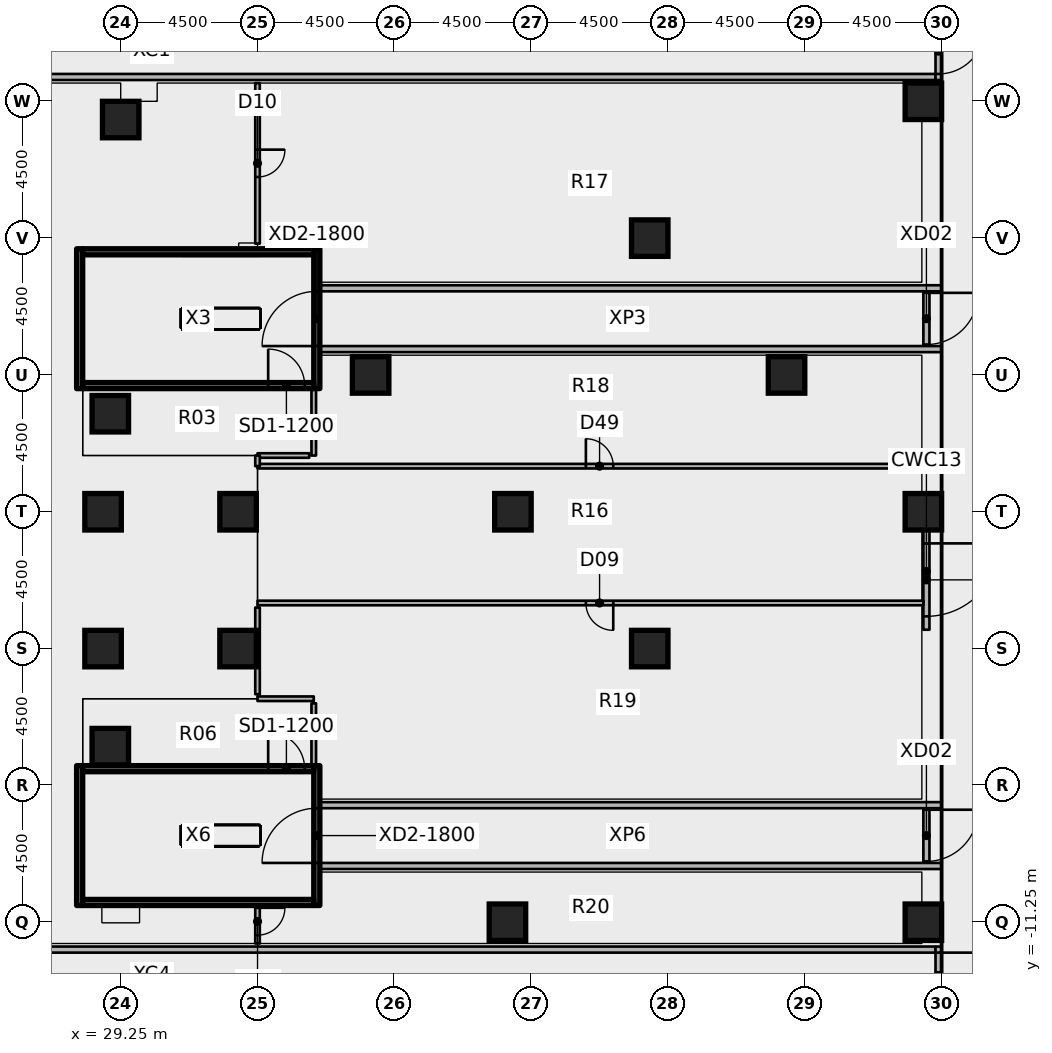
"""IFC4 building model, lengths in metres.
Left out: names, types, materials, properties, quantities, classifications, styles, units other than length and angle.
Written with IfcOpenShell. Run it as: python <this file> out.ifc"""

import sys

from ifc_helpers import new_model, si_unit, direction, frame, frame_2d, origin, origin_2d, place, context, subcontext, project, spatial, rectangle, extrude, element, fill, save


model = new_model("IFC4")
c1 = context("Model", 3, precision=1e-05, world=origin(), true_north=direction((0.0, 1.0)))
c2 = subcontext(c1, "Body", "Model", "MODEL_VIEW")
j1 = project(units=[si_unit("LENGTHUNIT", "METRE"), si_unit("PLANEANGLEUNIT", "RADIAN")], contexts=[c1])
p1 = place(None, origin())
s1 = spatial("IfcSite", under=j1, at=p1, CompositionType="ELEMENT")
p2 = place(p1, origin())
s2 = spatial("IfcBuilding", under=s1, at=p2, CompositionType="ELEMENT")
p3 = place(p2, origin())
s3 = spatial("IfcBuildingStorey", under=s2, at=p3, CompositionType="ELEMENT", Elevation=0.0)
for number, where, z_axis, x_axis in (
    (1, (28.908, -5.475, 0.0), (0.0, 0.0, 1.0), (1.0, 0.0, 0.0)),
    (2, (28.67, -2.25, 0.0), (0.0, 0.0, 1.0), (1.0, 0.0, 0.0)),
    (3, (28.67, 2.25, 0.0), (0.0, 0.0, 1.0), (1.0, 0.0, 0.0)),
    (4, (28.908, 5.475, 0.0), (0.0, 0.0, 1.0), (1.0, 0.0, 0.0)),
    (5, (29.25, 15.15, 0.0), (0.0, 0.0, 1.0), (1.0, 0.0, 0.0)),
    (6, (33.11, -2.25, 0.0), (0.0, 0.0, 1.0), (1.0, 0.0, 0.0)),
    (7, (33.11, 2.25, 0.0), (0.0, 0.0, 1.0), (1.0, 0.0, 0.0)),
    (8, (37.47, 6.75, 0.0), (0.0, 0.0, 1.0), (1.0, 0.0, 0.0)),
    (9, (41.97, -11.25, 0.0), (0.0, 0.0, 1.0), (1.0, 0.0, 0.0)),
    (10, (42.15, 2.25, 0.0), (0.0, 0.0, 1.0), (1.0, 0.0, 0.0)),
    (11, (46.65, -2.25, 0.0), (0.0, 0.0, 1.0), (1.0, 0.0, 0.0)),
    (12, (46.65, 11.25, 0.0), (0.0, 0.0, 1.0), (1.0, 0.0, 0.0)),
    (13, (51.15, 6.75, 0.0), (0.0, 0.0, 1.0), (1.0, 0.0, 0.0)),
    (14, (55.65, -11.25, 0.0), (0.0, 0.0, 1.0), (1.0, 0.0, 0.0)),
    (15, (55.65, 2.25, 0.0), (0.0, 0.0, 1.0), (1.0, 0.0, 0.0)),
    (16, (55.65, 15.75, 0.0), (0.0, 0.0, 1.0), (1.0, 0.0, 0.0)),
):
    element("IfcColumn", number, at=place(p3, frame(where, z_axis=z_axis, x_axis=x_axis)), inside=s3, PredefinedType="COLUMN", context=c2, shape_type="SweptSolid", body=[
        extrude(rectangle(XDim=1.2, YDim=1.2, at=origin_2d()), origin(), (0.0, 0.0, 1.0), 6.55),
    ])
p4 = place(p3, frame((55.75, 1.65, 0.0), z_axis=(0.0, 0.0, 1.0), x_axis=(0.0, -1.0, 0.0)))
e17 = element("IfcWall", 17, at=p4, inside=s3, PredefinedType="SOLIDWALL", context=c2, shape_type="SweptSolid", body=[
    extrude(rectangle(XDim=3.28, YDim=0.2, at=frame_2d((1.64, 0.0))), origin(), (0.0, 0.0, 1.0), 5.6),
])
p5 = place(p4, frame((0.44, 0.0, 0.0)))
e18 = element("IfcOpeningElement", 18, at=p5, cuts=e17, PredefinedType="OPENING", context=c2, shape_type="SweptSolid", body=[
    extrude(rectangle(XDim=2.4, YDim=2.7, at=frame_2d((1.2, 1.35))), frame((0.0, 0.11, 0.0), z_axis=(0.0, -1.0, 0.0), x_axis=(1.0, 0.0, 0.0)), (0.0, 0.0, 1.0), 0.22),
])
p6 = place(p3, frame((55.75, 9.5, 0.0), z_axis=(0.0, 0.0, 1.0), x_axis=(0.0, -1.0, 0.0)))
e19 = element("IfcWall", 19, at=p6, inside=s3, PredefinedType="SOLIDWALL", context=c2, shape_type="SweptSolid", body=[
    extrude(rectangle(XDim=1.8, YDim=0.2, at=frame_2d((0.9, 0.0))), origin(), (0.0, 0.0, 1.0), 3.0),
])
p7 = place(p6, frame((0.05, 0.0, 0.0)))
e20 = element("IfcOpeningElement", 20, at=p7, cuts=e19, PredefinedType="OPENING", context=c2, shape_type="SweptSolid", body=[
    extrude(rectangle(XDim=1.7, YDim=2.1, at=frame_2d((0.85, 1.05))), frame((0.0, 0.11, 0.0), z_axis=(0.0, -1.0, 0.0), x_axis=(1.0, 0.0, 0.0)), (0.0, 0.0, 1.0), 0.22),
])
p8 = place(p3, frame((55.75, -7.5, 0.0), z_axis=(0.0, 0.0, 1.0), x_axis=(0.0, -1.0, 0.0)))
e21 = element("IfcWall", 21, at=p8, inside=s3, PredefinedType="SOLIDWALL", context=c2, shape_type="SweptSolid", body=[
    extrude(rectangle(XDim=1.8, YDim=0.2, at=frame_2d((0.9, 0.0))), origin(), (0.0, 0.0, 1.0), 3.0),
])
p9 = place(p8, frame((0.05, 0.0, 0.0)))
e22 = element("IfcOpeningElement", 22, at=p9, cuts=e21, PredefinedType="OPENING", context=c2, shape_type="SweptSolid", body=[
    extrude(rectangle(XDim=1.7, YDim=2.1, at=frame_2d((0.85, 1.05))), frame((0.0, 0.11, 0.0), z_axis=(0.0, -1.0, 0.0), x_axis=(1.0, 0.0, 0.0)), (0.0, 0.0, 1.0), 0.22),
])
p10 = place(p3, frame((4.5, 16.55, 0.0), z_axis=(0.0, 0.0, 1.0), x_axis=(1.0, 0.0, 0.0)))
e23 = element("IfcWall", 23, at=p10, inside=s3, PredefinedType="PARTITIONING", context=c2, shape_type="SweptSolid", body=[
    extrude(rectangle(XDim=51.55, YDim=0.2, at=frame_2d((25.775, 0.0))), origin(), (0.0, 0.0, 1.0), 6.55),
])
p11 = place(p3, frame((56.15, 18.35, 0.0), z_axis=(0.0, 0.0, 1.0), x_axis=(0.0, -1.0, 0.0)))
e24 = element("IfcWall", 24, at=p11, inside=s3, PredefinedType="PARTITIONING", context=c2, shape_type="SweptSolid", body=[
    extrude(rectangle(XDim=1.9, YDim=0.2, at=frame_2d((0.95, 0.0))), origin(), (0.0, 0.0, 1.0), 6.55),
])
p12 = place(p11, frame((0.2, 0.0, 0.0)))
e25 = element("IfcOpeningElement", 25, at=p12, cuts=e24, PredefinedType="OPENING", context=c2, shape_type="SweptSolid", body=[
    extrude(rectangle(XDim=1.5, YDim=2.1, at=frame_2d((0.75, 1.05))), frame((0.0, 0.11, 0.0), z_axis=(0.0, -1.0, 0.0), x_axis=(1.0, 0.0, 0.0)), (0.0, 0.0, 1.0), 0.22),
])
p13 = place(p3, frame((4.5, -12.15, 0.0), z_axis=(0.0, 0.0, 1.0), x_axis=(1.0, 0.0, 0.0)))
e26 = element("IfcWall", 26, at=p13, inside=s3, PredefinedType="PARTITIONING", context=c2, shape_type="SweptSolid", body=[
    extrude(rectangle(XDim=51.55, YDim=0.2, at=frame_2d((25.775, 0.0))), origin(), (0.0, 0.0, 1.0), 6.55),
])
p14 = place(p3, frame((56.15, -12.05, 0.0), z_axis=(0.0, 0.0, 1.0), x_axis=(0.0, -1.0, 0.0)))
e27 = element("IfcWall", 27, at=p14, inside=s3, PredefinedType="PARTITIONING", context=c2, shape_type="SweptSolid", body=[
    extrude(rectangle(XDim=1.9, YDim=0.2, at=frame_2d((0.95, 0.0))), origin(), (0.0, 0.0, 1.0), 6.55),
])
p15 = place(p14, frame((0.2, 0.0, 0.0)))
e28 = element("IfcOpeningElement", 28, at=p15, cuts=e27, PredefinedType="OPENING", context=c2, shape_type="SweptSolid", body=[
    extrude(rectangle(XDim=1.5, YDim=2.1, at=frame_2d((0.75, 1.05))), frame((0.0, 0.11, 0.0), z_axis=(0.0, -1.0, 0.0), x_axis=(1.0, 0.0, 0.0)), (0.0, 0.0, 1.0), 0.22),
])
p16 = place(p3, frame((27.9, 6.3, 0.0), z_axis=(0.0, 0.0, 1.0), x_axis=(0.0, 1.0, 0.0)))
e29 = element("IfcWall", 29, at=p16, inside=s3, PredefinedType="SHEAR", context=c2, shape_type="SweptSolid", body=[
    extrude(rectangle(XDim=4.6, YDim=0.2, at=frame_2d((2.3, 0.0))), origin(), (0.0, 0.0, 1.0), 6.55),
])
p17 = place(p3, frame((35.7, 6.3, 0.0), z_axis=(0.0, 0.0, 1.0), x_axis=(0.0, 1.0, 0.0)))
e30 = element("IfcWall", 30, at=p17, inside=s3, PredefinedType="SHEAR", context=c2, shape_type="SweptSolid", body=[
    extrude(rectangle(XDim=4.6, YDim=0.2, at=frame_2d((2.3, 0.0))), origin(), (0.0, 0.0, 1.0), 6.55),
])
p18 = place(p17, frame((1.4, 0.0, 0.0)))
e31 = element("IfcOpeningElement", 31, at=p18, cuts=e30, PredefinedType="OPENING", context=c2, shape_type="SweptSolid", body=[
    extrude(rectangle(XDim=1.8, YDim=2.1, at=frame_2d((0.9, 1.05))), frame((0.0, 0.11, 0.0), z_axis=(0.0, -1.0, 0.0), x_axis=(1.0, 0.0, 0.0)), (0.0, 0.0, 1.0), 0.22),
])
p19 = place(p3, frame((28.0, 6.4, 0.0), z_axis=(0.0, 0.0, 1.0), x_axis=(1.0, 0.0, 0.0)))
e32 = element("IfcWall", 32, at=p19, inside=s3, PredefinedType="SHEAR", context=c2, shape_type="SweptSolid", body=[
    extrude(rectangle(XDim=7.6, YDim=0.2, at=frame_2d((3.8, 0.0))), origin(), (0.0, 0.0, 1.0), 6.55),
])
p20 = place(p19, frame((6.1, 0.0, 0.0)))
e33 = element("IfcOpeningElement", 33, at=p20, cuts=e32, PredefinedType="OPENING", context=c2, shape_type="SweptSolid", body=[
    extrude(rectangle(XDim=1.2, YDim=2.1, at=frame_2d((0.6, 1.05))), frame((0.0, 0.11, 0.0), z_axis=(0.0, -1.0, 0.0), x_axis=(1.0, 0.0, 0.0)), (0.0, 0.0, 1.0), 0.22),
])
p21 = place(p3, frame((28.0, 10.8, 0.0), z_axis=(0.0, 0.0, 1.0), x_axis=(1.0, 0.0, 0.0)))
e34 = element("IfcWall", 34, at=p21, inside=s3, PredefinedType="SHEAR", context=c2, shape_type="SweptSolid", body=[
    extrude(rectangle(XDim=7.6, YDim=0.2, at=frame_2d((3.8, 0.0))), origin(), (0.0, 0.0, 1.0), 6.55),
])
for number, where, z_axis, x_axis in (
    (35, (35.6, 7.6, 0.0), (0.0, 0.0, 1.0), (1.0, 0.0, 0.0)),
    (36, (35.6, 9.6, 0.0), (0.0, 0.0, 1.0), (1.0, 0.0, 0.0)),
):
    element("IfcWall", number, at=place(p3, frame(where, z_axis=z_axis, x_axis=x_axis)), inside=s3, PredefinedType="PARTITIONING", context=c2, shape_type="SweptSolid", body=[
        extrude(rectangle(XDim=20.65, YDim=0.2, at=frame_2d((10.325, 0.0))), origin(), (0.0, 0.0, 1.0), 6.55),
    ])
p22 = place(p3, frame((27.9, -10.7, 0.0), z_axis=(0.0, 0.0, 1.0), x_axis=(0.0, 1.0, 0.0)))
e37 = element("IfcWall", 37, at=p22, inside=s3, PredefinedType="SHEAR", context=c2, shape_type="SweptSolid", body=[
    extrude(rectangle(XDim=4.6, YDim=0.2, at=frame_2d((2.3, 0.0))), origin(), (0.0, 0.0, 1.0), 6.55),
])
p23 = place(p3, frame((35.7, -10.7, 0.0), z_axis=(0.0, 0.0, 1.0), x_axis=(0.0, 1.0, 0.0)))
e38 = element("IfcWall", 38, at=p23, inside=s3, PredefinedType="SHEAR", context=c2, shape_type="SweptSolid", body=[
    extrude(rectangle(XDim=4.6, YDim=0.2, at=frame_2d((2.3, 0.0))), origin(), (0.0, 0.0, 1.0), 6.55),
])
p24 = place(p23, frame((1.4, 0.0, 0.0)))
e39 = element("IfcOpeningElement", 39, at=p24, cuts=e38, PredefinedType="OPENING", context=c2, shape_type="SweptSolid", body=[
    extrude(rectangle(XDim=1.8, YDim=2.1, at=frame_2d((0.9, 1.05))), frame((0.0, 0.11, 0.0), z_axis=(0.0, -1.0, 0.0), x_axis=(1.0, 0.0, 0.0)), (0.0, 0.0, 1.0), 0.22),
])
p25 = place(p3, frame((28.0, -10.6, 0.0), z_axis=(0.0, 0.0, 1.0), x_axis=(1.0, 0.0, 0.0)))
e40 = element("IfcWall", 40, at=p25, inside=s3, PredefinedType="SHEAR", context=c2, shape_type="SweptSolid", body=[
    extrude(rectangle(XDim=7.6, YDim=0.2, at=frame_2d((3.8, 0.0))), origin(), (0.0, 0.0, 1.0), 6.55),
])
p26 = place(p3, frame((28.0, -6.2, 0.0), z_axis=(0.0, 0.0, 1.0), x_axis=(1.0, 0.0, 0.0)))
e41 = element("IfcWall", 41, at=p26, inside=s3, PredefinedType="SHEAR", context=c2, shape_type="SweptSolid", body=[
    extrude(rectangle(XDim=7.6, YDim=0.2, at=frame_2d((3.8, 0.0))), origin(), (0.0, 0.0, 1.0), 6.55),
])
p27 = place(p26, frame((6.1, 0.0, 0.0)))
e42 = element("IfcOpeningElement", 42, at=p27, cuts=e41, PredefinedType="OPENING", context=c2, shape_type="SweptSolid", body=[
    extrude(rectangle(XDim=1.2, YDim=2.1, at=frame_2d((0.6, 1.05))), frame((0.0, 0.11, 0.0), z_axis=(0.0, -1.0, 0.0), x_axis=(1.0, 0.0, 0.0)), (0.0, 0.0, 1.0), 0.22),
])
for number, where, z_axis, x_axis in (
    (43, (35.6, -9.4, 0.0), (0.0, 0.0, 1.0), (1.0, 0.0, 0.0)),
    (44, (35.6, -7.4, 0.0), (0.0, 0.0, 1.0), (1.0, 0.0, 0.0)),
):
    element("IfcWall", number, at=place(p3, frame(where, z_axis=z_axis, x_axis=x_axis)), inside=s3, PredefinedType="PARTITIONING", context=c2, shape_type="SweptSolid", body=[
        extrude(rectangle(XDim=20.65, YDim=0.2, at=frame_2d((10.325, 0.0))), origin(), (0.0, 0.0, 1.0), 6.55),
    ])
p28 = place(p3, frame((35.6, 6.3, 0.0), z_axis=(0.0, 0.0, 1.0), x_axis=(0.0, -1.0, 0.0)))
e45 = element("IfcWall", 45, at=p28, inside=s3, PredefinedType="PARTITIONING", context=c2, shape_type="SweptSolid", body=[
    extrude(rectangle(XDim=2.2, YDim=0.15, at=frame_2d((1.1, 0.0))), origin(), (0.0, 0.0, 1.0), 6.55),
])
p29 = place(p3, frame((35.45, 4.1, 0.0), z_axis=(0.0, 0.0, 1.0), x_axis=(-1.0, 0.0, 0.0)))
e46 = element("IfcWall", 46, at=p29, inside=s3, PredefinedType="PARTITIONING", context=c2, shape_type="SweptSolid", body=[
    extrude(rectangle(XDim=1.7, YDim=0.15, at=frame_2d((0.85, 0.0))), origin(), (0.0, 0.0, 1.0), 6.55),
])
p30 = place(p3, frame((33.75, -3.9, 0.0), z_axis=(0.0, 0.0, 1.0), x_axis=(1.0, 0.0, 0.0)))
e47 = element("IfcWall", 47, at=p30, inside=s3, PredefinedType="PARTITIONING", context=c2, shape_type="SweptSolid", body=[
    extrude(rectangle(XDim=1.85, YDim=0.15, at=frame_2d((0.925, 0.0))), origin(), (0.0, 0.0, 1.0), 6.55),
])
p31 = place(p3, frame((35.6, -4.05, 0.0), z_axis=(0.0, 0.0, 1.0), x_axis=(0.0, -1.0, 0.0)))
e48 = element("IfcWall", 48, at=p31, inside=s3, PredefinedType="PARTITIONING", context=c2, shape_type="SweptSolid", body=[
    extrude(rectangle(XDim=2.05, YDim=0.15, at=frame_2d((1.025, 0.0))), origin(), (0.0, 0.0, 1.0), 6.55),
])
p32 = place(p3, frame((33.75, 3.75, 0.0), z_axis=(0.0, 0.0, 1.0), x_axis=(1.0, 0.0, 0.0)))
e49 = element("IfcWall", 49, at=p32, inside=s3, PredefinedType="PARTITIONING", context=c2, shape_type="SweptSolid", body=[
    extrude(rectangle(XDim=21.9, YDim=0.15, at=frame_2d((10.95, 0.0))), origin(), (0.0, 0.0, 1.0), 6.55),
])
p33 = place(p32, frame((10.8, 0.0, 0.0)))
e50 = element("IfcOpeningElement", 50, at=p33, cuts=e49, PredefinedType="OPENING", context=c2, shape_type="SweptSolid", body=[
    extrude(rectangle(XDim=0.9, YDim=2.1, at=frame_2d((0.45, 1.05))), frame((0.0, 0.085, 0.0), z_axis=(0.0, -1.0, 0.0), x_axis=(1.0, 0.0, 0.0)), (0.0, 0.0, 1.0), 0.17),
])
p34 = place(p3, frame((55.65, -0.75, 0.0), z_axis=(0.0, 0.0, 1.0), x_axis=(-1.0, 0.0, 0.0)))
e51 = element("IfcWall", 51, at=p34, inside=s3, PredefinedType="PARTITIONING", context=c2, shape_type="SweptSolid", body=[
    extrude(rectangle(XDim=21.9, YDim=0.15, at=frame_2d((10.95, 0.0))), origin(), (0.0, 0.0, 1.0), 6.55),
])
p35 = place(p34, frame((10.2, 0.0, 0.0)))
e52 = element("IfcOpeningElement", 52, at=p35, cuts=e51, PredefinedType="OPENING", context=c2, shape_type="SweptSolid", body=[
    extrude(rectangle(XDim=0.9, YDim=2.1, at=frame_2d((0.45, 1.05))), frame((0.0, 0.085, 0.0), z_axis=(0.0, -1.0, 0.0), x_axis=(1.0, 0.0, 0.0)), (0.0, 0.0, 1.0), 0.17),
])
p36 = place(p3, frame((33.75, 16.35, 0.0), z_axis=(0.0, 0.0, 1.0), x_axis=(0.0, -1.0, 0.0)))
e53 = element("IfcWall", 53, at=p36, inside=s3, PredefinedType="PARTITIONING", context=c2, shape_type="SweptSolid", body=[
    extrude(rectangle(XDim=5.28, YDim=0.15, at=frame_2d((2.64, 0.0))), origin(), (0.0, 0.0, 1.0), 6.55),
])
p37 = place(p36, frame((2.19, 0.0, 0.0)))
e54 = element("IfcOpeningElement", 54, at=p37, cuts=e53, PredefinedType="OPENING", context=c2, shape_type="SweptSolid", body=[
    extrude(rectangle(XDim=0.9, YDim=2.1, at=frame_2d((0.45, 1.05))), frame((0.0, 0.085, 0.0), z_axis=(0.0, -1.0, 0.0), x_axis=(1.0, 0.0, 0.0)), (0.0, 0.0, 1.0), 0.17),
])
p38 = place(p3, frame((33.75, 3.75, 0.0), z_axis=(0.0, 0.0, 1.0), x_axis=(0.0, 1.0, 0.0)))
e55 = element("IfcWall", 55, at=p38, inside=s3, PredefinedType="PARTITIONING", context=c2, shape_type="SweptSolid", body=[
    extrude(rectangle(XDim=0.35, YDim=0.15, at=frame_2d((0.175, 0.0))), origin(), (0.0, 0.0, 1.0), 6.55),
])
p39 = place(p3, frame((33.75, -3.75, 0.0), z_axis=(0.0, 0.0, 1.0), x_axis=(0.0, 1.0, 0.0)))
e56 = element("IfcWall", 56, at=p39, inside=s3, PredefinedType="PARTITIONING", context=c2, shape_type="SweptSolid", body=[
    extrude(rectangle(XDim=2.85, YDim=0.15, at=frame_2d((1.425, 0.0))), origin(), (0.0, 0.0, 1.0), 6.55),
])
p40 = place(p3, frame((33.75, -10.5, 0.0), z_axis=(0.0, 0.0, 1.0), x_axis=(0.0, -1.0, 0.0)))
e57 = element("IfcWall", 57, at=p40, inside=s3, PredefinedType="PARTITIONING", context=c2, shape_type="SweptSolid", body=[
    extrude(rectangle(XDim=1.45, YDim=0.15, at=frame_2d((0.725, 0.0))), origin(), (0.0, 0.0, 1.0), 6.55),
])
p41 = place(p40, frame((0.275, 0.0, 0.0)))
e58 = element("IfcOpeningElement", 58, at=p41, cuts=e57, PredefinedType="OPENING", context=c2, shape_type="SweptSolid", body=[
    extrude(rectangle(XDim=0.9, YDim=2.1, at=frame_2d((0.45, 1.05))), frame((0.0, 0.085, 0.0), z_axis=(0.0, -1.0, 0.0), x_axis=(1.0, 0.0, 0.0)), (0.0, 0.0, 1.0), 0.17),
])
p42 = place(p5, origin())
e59 = element("IfcDoor", 59, at=p42, inside=s3, OperationType="SINGLE_SWING_LEFT", PredefinedType="DOOR", context=c2, shape_type="SweptSolid", body=[
    extrude(rectangle(XDim=2.4, YDim=2.7, at=frame_2d((1.2, 1.35))), frame((0.0, 0.025, 0.0), z_axis=(0.0, -1.0, 0.0), x_axis=(1.0, 0.0, 0.0)), (0.0, 0.0, 1.0), 0.05),
])
fill(e18, e59)
p43 = place(p7, origin())
e60 = element("IfcDoor", 60, at=p43, inside=s3, OperationType="SINGLE_SWING_LEFT", PredefinedType="DOOR", context=c2, shape_type="SweptSolid", body=[
    extrude(rectangle(XDim=1.7, YDim=2.1, at=frame_2d((0.85, 1.05))), frame((0.0, 0.025, 0.0), z_axis=(0.0, -1.0, 0.0), x_axis=(1.0, 0.0, 0.0)), (0.0, 0.0, 1.0), 0.05),
])
fill(e20, e60)
p44 = place(p9, origin())
e61 = element("IfcDoor", 61, at=p44, inside=s3, OperationType="SINGLE_SWING_LEFT", PredefinedType="DOOR", context=c2, shape_type="SweptSolid", body=[
    extrude(rectangle(XDim=1.7, YDim=2.1, at=frame_2d((0.85, 1.05))), frame((0.0, 0.025, 0.0), z_axis=(0.0, -1.0, 0.0), x_axis=(1.0, 0.0, 0.0)), (0.0, 0.0, 1.0), 0.05),
])
fill(e22, e61)
p45 = place(p12, origin())
e62 = element("IfcDoor", 62, at=p45, inside=s3, OperationType="DOUBLE_DOOR_DOUBLE_SWING", PredefinedType="DOOR", context=c2, shape_type="SweptSolid", body=[
    extrude(rectangle(XDim=1.5, YDim=2.1, at=frame_2d((0.75, 1.05))), frame((0.0, 0.025, 0.0), z_axis=(0.0, -1.0, 0.0), x_axis=(1.0, 0.0, 0.0)), (0.0, 0.0, 1.0), 0.05),
])
fill(e25, e62)
p46 = place(p15, origin())
e63 = element("IfcDoor", 63, at=p46, inside=s3, OperationType="DOUBLE_DOOR_DOUBLE_SWING", PredefinedType="DOOR", context=c2, shape_type="SweptSolid", body=[
    extrude(rectangle(XDim=1.5, YDim=2.1, at=frame_2d((0.75, 1.05))), frame((0.0, 0.025, 0.0), z_axis=(0.0, -1.0, 0.0), x_axis=(1.0, 0.0, 0.0)), (0.0, 0.0, 1.0), 0.05),
])
fill(e28, e63)
p47 = place(p20, origin())
e64 = element("IfcDoor", 64, at=p47, inside=s3, OperationType="SINGLE_SWING_RIGHT", PredefinedType="DOOR", context=c2, shape_type="SweptSolid", body=[
    extrude(rectangle(XDim=1.2, YDim=2.1, at=frame_2d((0.6, 1.05))), frame((0.0, 0.025, 0.0), z_axis=(0.0, -1.0, 0.0), x_axis=(1.0, 0.0, 0.0)), (0.0, 0.0, 1.0), 0.05),
])
fill(e33, e64)
p48 = place(p18, origin())
e65 = element("IfcDoor", 65, at=p48, inside=s3, OperationType="DOUBLE_DOOR_SINGLE_SWING", PredefinedType="DOOR", context=c2, shape_type="SweptSolid", body=[
    extrude(rectangle(XDim=1.8, YDim=2.1, at=frame_2d((0.9, 1.05))), frame((0.0, 0.025, 0.0), z_axis=(0.0, -1.0, 0.0), x_axis=(1.0, 0.0, 0.0)), (0.0, 0.0, 1.0), 0.05),
])
fill(e31, e65)
p49 = place(p27, origin())
e66 = element("IfcDoor", 66, at=p49, inside=s3, OperationType="SINGLE_SWING_RIGHT", PredefinedType="DOOR", context=c2, shape_type="SweptSolid", body=[
    extrude(rectangle(XDim=1.2, YDim=2.1, at=frame_2d((0.6, 1.05))), frame((0.0, 0.025, 0.0), z_axis=(0.0, -1.0, 0.0), x_axis=(1.0, 0.0, 0.0)), (0.0, 0.0, 1.0), 0.05),
])
fill(e42, e66)
p50 = place(p24, origin())
e67 = element("IfcDoor", 67, at=p50, inside=s3, OperationType="DOUBLE_DOOR_SINGLE_SWING", PredefinedType="DOOR", context=c2, shape_type="SweptSolid", body=[
    extrude(rectangle(XDim=1.8, YDim=2.1, at=frame_2d((0.9, 1.05))), frame((0.0, 0.025, 0.0), z_axis=(0.0, -1.0, 0.0), x_axis=(1.0, 0.0, 0.0)), (0.0, 0.0, 1.0), 0.05),
])
fill(e39, e67)
p51 = place(p33, origin())
e68 = element("IfcDoor", 68, at=p51, inside=s3, OperationType="SINGLE_SWING_LEFT", PredefinedType="DOOR", context=c2, shape_type="SweptSolid", body=[
    extrude(rectangle(XDim=0.9, YDim=2.1, at=frame_2d((0.45, 1.05))), frame((0.0, 0.025, 0.0), z_axis=(0.0, -1.0, 0.0), x_axis=(1.0, 0.0, 0.0)), (0.0, 0.0, 1.0), 0.05),
])
fill(e50, e68)
p52 = place(p35, origin())
e69 = element("IfcDoor", 69, at=p52, inside=s3, OperationType="SINGLE_SWING_LEFT", PredefinedType="DOOR", context=c2, shape_type="SweptSolid", body=[
    extrude(rectangle(XDim=0.9, YDim=2.1, at=frame_2d((0.45, 1.05))), frame((0.0, 0.025, 0.0), z_axis=(0.0, -1.0, 0.0), x_axis=(1.0, 0.0, 0.0)), (0.0, 0.0, 1.0), 0.05),
])
fill(e52, e69)
p53 = place(p37, origin())
e70 = element("IfcDoor", 70, at=p53, inside=s3, OperationType="SINGLE_SWING_LEFT", PredefinedType="DOOR", context=c2, shape_type="SweptSolid", body=[
    extrude(rectangle(XDim=0.9, YDim=2.1, at=frame_2d((0.45, 1.05))), frame((0.0, 0.025, 0.0), z_axis=(0.0, -1.0, 0.0), x_axis=(1.0, 0.0, 0.0)), (0.0, 0.0, 1.0), 0.05),
])
fill(e54, e70)
p54 = place(p41, origin())
e71 = element("IfcDoor", 71, at=p54, inside=s3, OperationType="SINGLE_SWING_LEFT", PredefinedType="DOOR", context=c2, shape_type="SweptSolid", body=[
    extrude(rectangle(XDim=0.9, YDim=2.1, at=frame_2d((0.45, 1.05))), frame((0.0, 0.025, 0.0), z_axis=(0.0, -1.0, 0.0), x_axis=(1.0, 0.0, 0.0)), (0.0, 0.0, 1.0), 0.05),
])
fill(e58, e71)
save(model, sys.argv[1])
